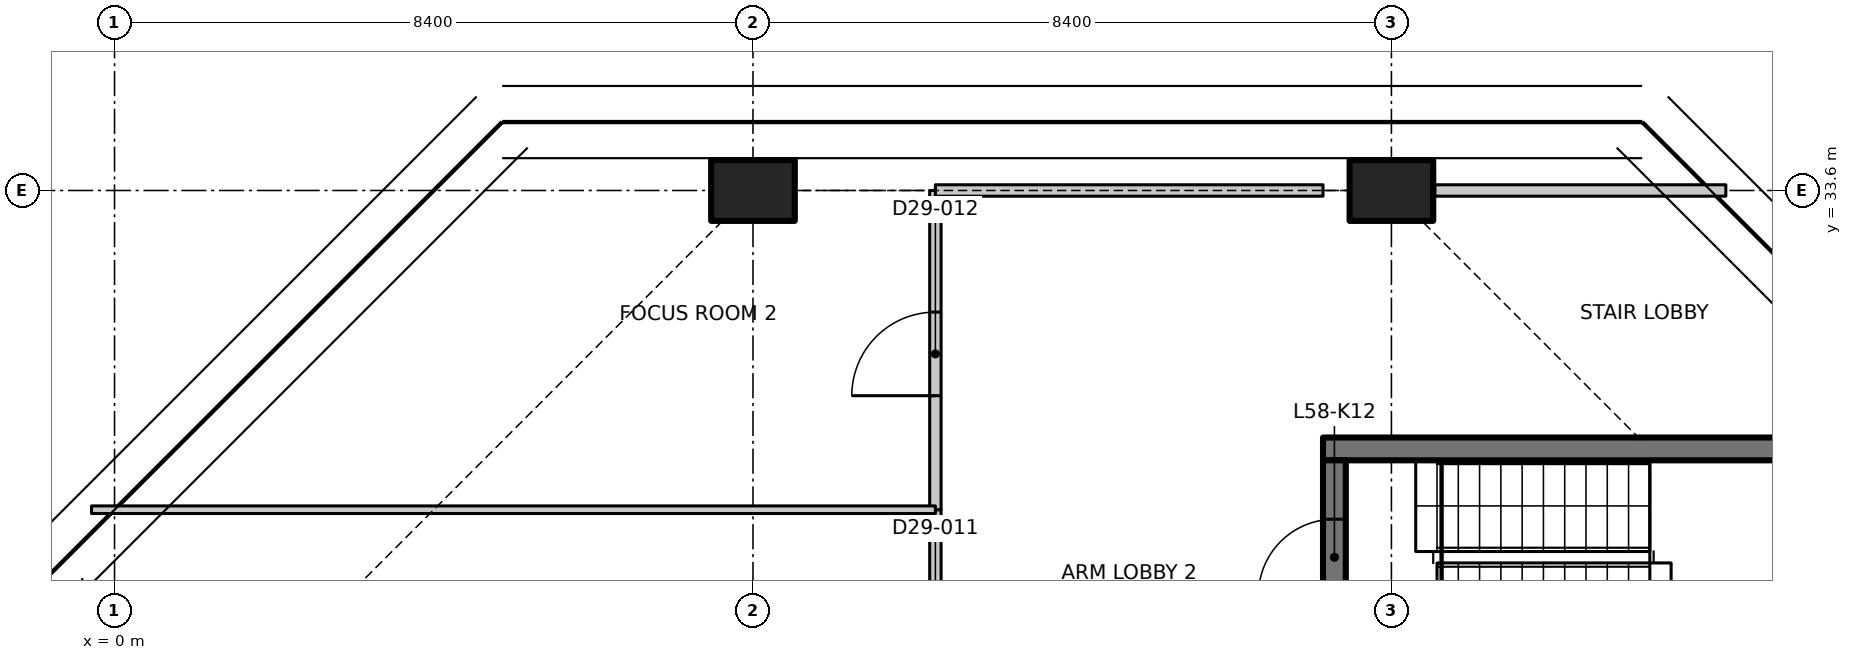
"""IFC4 building model, lengths in metres.
Left out: names, types, materials, properties, quantities, classifications, styles, units other than length and angle.
Written with IfcOpenShell. Run it as: python <this file> out.ifc"""

import sys

from ifc_helpers import new_model, si_unit, direction, frame, frame_2d, origin, origin_2d, place, context, subcontext, project, spatial, polyline, rectangle, outline, extrude, element, fill, save


model = new_model("IFC4")
c1 = context("Model", 3, precision=1e-05, world=origin(), true_north=direction((0.0, 1.0)))
c2 = subcontext(c1, "Body", "Model", "MODEL_VIEW")
j1 = project(units=[si_unit("LENGTHUNIT", "METRE"), si_unit("PLANEANGLEUNIT", "RADIAN")], contexts=[c1])
p1 = place(None, origin())
s1 = spatial("IfcSite", under=j1, at=p1, CompositionType="ELEMENT")
p2 = place(p1, origin())
s2 = spatial("IfcBuilding", under=s1, at=p2, CompositionType="ELEMENT")
p3 = place(p2, frame((0.0, 0.0, 230.1)))
s3 = spatial("IfcBuildingStorey", under=s2, at=p3, CompositionType="ELEMENT", Elevation=230.1)
for number, where, z_axis, x_axis in (
    (1, (8.4, 33.6, 0.0), (0.0, 0.0, 1.0), (0.0, 1.0, 0.0)),
    (2, (16.8, 33.6, 0.0), (0.0, 0.0, 1.0), (0.0, 1.0, 0.0)),
):
    element("IfcColumn", number, at=place(p3, frame(where, z_axis=z_axis, x_axis=x_axis)), inside=s3, PredefinedType="COLUMN", context=c2, shape_type="SweptSolid", body=[
        extrude(rectangle(XDim=0.8, YDim=1.1, at=origin_2d()), origin(), (0.0, 0.0, 1.0), 3.35),
    ])
p4 = place(p3, frame((15.9, 30.2, 0.0), z_axis=(0.0, 0.0, 1.0), x_axis=(1.0, 0.0, 0.0)))
e3 = element("IfcWall", 3, at=p4, inside=s3, PredefinedType="SHEAR", context=c2, shape_type="SweptSolid", body=[
    extrude(rectangle(XDim=8.2, YDim=0.3, at=frame_2d((4.1, 0.0))), origin(), (0.0, 0.0, 1.0), 3.35),
])
p5 = place(p3, frame((16.05, 27.5, 0.0), z_axis=(0.0, 0.0, 1.0), x_axis=(0.0, 1.0, 0.0)))
e4 = element("IfcWall", 4, at=p5, inside=s3, PredefinedType="SHEAR", context=c2, shape_type="SweptSolid", body=[
    extrude(rectangle(XDim=2.55, YDim=0.3, at=frame_2d((1.275, 0.0))), origin(), (0.0, 0.0, 1.0), 3.35),
])
p6 = place(p5, frame((0.775, 0.0, 0.0)))
e5 = element("IfcOpeningElement", 5, at=p6, cuts=e4, PredefinedType="OPENING", context=c2, shape_type="SweptSolid", body=[
    extrude(rectangle(XDim=1.0, YDim=2.1, at=frame_2d((0.5, 1.05))), frame((0.0, 0.16, 0.0), z_axis=(0.0, -1.0, 0.0), x_axis=(1.0, 0.0, 0.0)), (0.0, 0.0, 1.0), 0.32),
])
p7 = place(p3, frame((10.8, 25.2, 0.0), z_axis=(0.0, 0.0, 1.0), x_axis=(0.0, 1.0, 0.0)))
e6 = element("IfcWall", 6, at=p7, inside=s3, PredefinedType="PARTITIONING", context=c2, shape_type="SweptSolid", body=[
    extrude(rectangle(XDim=4.2, YDim=0.15, at=frame_2d((2.1, 0.0))), origin(), (0.0, 0.0, 1.0), 3.33),
])
p8 = place(p7, frame((1.5, 0.0, 0.0)))
e7 = element("IfcOpeningElement", 7, at=p8, cuts=e6, PredefinedType="OPENING", context=c2, shape_type="SweptSolid", body=[
    extrude(rectangle(XDim=1.1, YDim=2.1, at=frame_2d((0.55, 1.05))), frame((0.0, 0.085, 0.0), z_axis=(0.0, -1.0, 0.0), x_axis=(1.0, 0.0, 0.0)), (0.0, 0.0, 1.0), 0.17),
])
p9 = place(p3, frame((10.8, 29.4, 0.0), z_axis=(0.0, 0.0, 1.0), x_axis=(0.0, 1.0, 0.0)))
e8 = element("IfcWall", 8, at=p9, inside=s3, PredefinedType="PARTITIONING", context=c2, shape_type="SweptSolid", body=[
    extrude(rectangle(XDim=4.2, YDim=0.15, at=frame_2d((2.1, 0.0))), origin(), (0.0, 0.0, 1.0), 2.98),
])
p10 = place(p9, frame((1.5, 0.0, 0.0)))
e9 = element("IfcOpeningElement", 9, at=p10, cuts=e8, PredefinedType="OPENING", context=c2, shape_type="SweptSolid", body=[
    extrude(rectangle(XDim=1.1, YDim=2.1, at=frame_2d((0.55, 1.05))), frame((0.0, 0.085, 0.0), z_axis=(0.0, -1.0, 0.0), x_axis=(1.0, 0.0, 0.0)), (0.0, 0.0, 1.0), 0.17),
])
p11 = place(p3, frame((10.8, 33.6, 0.0), z_axis=(0.0, 0.0, 1.0), x_axis=(1.0, 0.0, 0.0)))
e10 = element("IfcWall", 10, at=p11, inside=s3, PredefinedType="PARTITIONING", context=c2, shape_type="SweptSolid", body=[
    extrude(outline(polyline([(0.0, 0.0), (5.1, 0.0), (5.1, 2.98), (0.0, 2.98), (0.0, 0.0)])), frame((0.0, 0.075, 0.0), z_axis=(0.0, -1.0, 0.0), x_axis=(1.0, 0.0, 0.0)), (0.0, 0.0, 1.0), 0.15),
])
p12 = place(p3, frame((17.37, 33.6, 0.0), z_axis=(0.0, 0.0, 1.0), x_axis=(1.0, 0.0, 0.0)))
e11 = element("IfcWall", 11, at=p12, inside=s3, PredefinedType="PARTITIONING", context=c2, shape_type="SweptSolid", body=[
    extrude(rectangle(XDim=3.83, YDim=0.15, at=frame_2d((1.915, 0.0))), origin(), (0.0, 0.0, 1.0), 2.98),
])
p13 = place(p3, frame((-0.302, 29.4, 0.0), z_axis=(0.0, 0.0, 1.0), x_axis=(1.0, 0.0, 0.0)))
e12 = element("IfcWall", 12, at=p13, inside=s3, PredefinedType="PARTITIONING", context=c2, shape_type="SweptSolid", body=[
    extrude(outline(polyline([(0.0, 0.0), (11.103, 0.0), (11.103, 3.33), (5.168, 3.33), (5.166, 2.98), (3.839, 2.98), (3.837, 3.33), (0.103, 3.33), (0.0, 3.33), (0.0, 0.0)])), frame((0.0, 0.05, 0.0), z_axis=(0.0, -1.0, 0.0), x_axis=(1.0, 0.0, 0.0)), (0.0, 0.0, 1.0), 0.1),
])
p14 = place(p6, origin())
e13 = element("IfcDoor", 13, at=p14, inside=s3, OperationType="SINGLE_SWING_LEFT", PredefinedType="DOOR", context=c2, shape_type="SweptSolid", body=[
    extrude(rectangle(XDim=1.0, YDim=2.1, at=frame_2d((0.5, 1.05))), frame((0.0, 0.025, 0.0), z_axis=(0.0, -1.0, 0.0), x_axis=(1.0, 0.0, 0.0)), (0.0, 0.0, 1.0), 0.05),
])
fill(e5, e13)
p15 = place(p10, origin())
e14 = element("IfcDoor", 14, at=p15, inside=s3, OperationType="SINGLE_SWING_LEFT", PredefinedType="DOOR", context=c2, shape_type="SweptSolid", body=[
    extrude(rectangle(XDim=1.1, YDim=2.1, at=frame_2d((0.55, 1.05))), frame((0.0, 0.025, 0.0), z_axis=(0.0, -1.0, 0.0), x_axis=(1.0, 0.0, 0.0)), (0.0, 0.0, 1.0), 0.05),
])
fill(e9, e14)
save(model, sys.argv[1])
